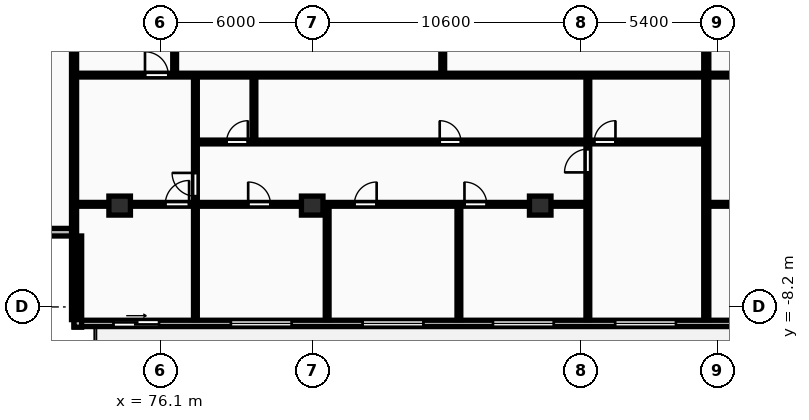
"""IFC4 building model, lengths in metres.
Left out: names, types, materials, properties, quantities, classifications, styles, units other than length and angle.
Written with IfcOpenShell. Run it as: python <this file> out.ifc"""

import sys

from ifc_helpers import new_model, si_unit, direction, frame, frame_2d, origin, origin_2d, place, context, subcontext, project, spatial, rectangle, extrude, element, fill, save


model = new_model("IFC4")
c1 = context("Model", 3, precision=1e-05, world=origin(), true_north=direction((0.0, 1.0)))
c2 = subcontext(c1, "Body", "Model", "MODEL_VIEW")
j1 = project(units=[si_unit("LENGTHUNIT", "METRE"), si_unit("PLANEANGLEUNIT", "RADIAN")], contexts=[c1])
p1 = place(None, origin())
s1 = spatial("IfcSite", under=j1, at=p1, CompositionType="ELEMENT")
p2 = place(p1, origin())
s2 = spatial("IfcBuilding", under=s1, at=p2, CompositionType="ELEMENT")
p3 = place(p2, frame((0.0, 0.0, 132.8)))
s3 = spatial("IfcBuildingStorey", under=s2, at=p3, CompositionType="ELEMENT", Elevation=132.8)
for number, where, z_axis, x_axis in (
    (1, (74.5, -4.2, 0.0), (0.0, 0.0, 1.0), (1.0, 0.0, 0.0)),
    (2, (82.1, -4.2, 0.0), (0.0, 0.0, 1.0), (1.0, 0.0, 0.0)),
    (3, (91.1, -4.2, 0.0), (0.0, 0.0, 1.0), (1.0, 0.0, 0.0)),
):
    element("IfcColumn", number, at=place(p3, frame(where, z_axis=z_axis, x_axis=x_axis)), inside=s3, PredefinedType="COLUMN", context=c2, shape_type="SweptSolid", body=[
        extrude(rectangle(XDim=0.85, YDim=0.75, at=origin_2d()), origin(), (0.0, 0.0, 1.0), 3.25),
    ])
p4 = place(p3, frame((72.7, -8.85, 0.0), z_axis=(0.0, 0.0, 1.0), x_axis=(1.0, 0.0, 0.0)))
e4 = element("IfcWall", 4, at=p4, inside=s3, PredefinedType="STANDARD", context=c2, shape_type="SweptSolid", body=[
    extrude(rectangle(XDim=58.0, YDim=0.25, at=frame_2d((29.0, 0.0))), origin(), (0.0, 0.0, 1.0), 2.97),
])
p5 = place(p4, frame((6.19, 0.0, 0.85)))
e5 = element("IfcOpeningElement", 5, at=p5, cuts=e4, PredefinedType="OPENING", context=c2, shape_type="SweptSolid", body=[
    extrude(rectangle(XDim=2.4, YDim=1.9, at=frame_2d((1.2, 0.95))), frame((0.0, 0.135, 0.0), z_axis=(0.0, -1.0, 0.0), x_axis=(1.0, 0.0, 0.0)), (0.0, 0.0, 1.0), 0.27),
])
p6 = place(p4, frame((11.39, 0.0, 0.85)))
e6 = element("IfcOpeningElement", 6, at=p6, cuts=e4, PredefinedType="OPENING", context=c2, shape_type="SweptSolid", body=[
    extrude(rectangle(XDim=2.4, YDim=1.9, at=frame_2d((1.2, 0.95))), frame((0.0, 0.135, 0.0), z_axis=(0.0, -1.0, 0.0), x_axis=(1.0, 0.0, 0.0)), (0.0, 0.0, 1.0), 0.27),
])
p7 = place(p4, frame((16.535, 0.0, 0.85)))
e7 = element("IfcOpeningElement", 7, at=p7, cuts=e4, PredefinedType="OPENING", context=c2, shape_type="SweptSolid", body=[
    extrude(rectangle(XDim=2.4, YDim=1.9, at=frame_2d((1.2, 0.95))), frame((0.0, 0.135, 0.0), z_axis=(0.0, -1.0, 0.0), x_axis=(1.0, 0.0, 0.0)), (0.0, 0.0, 1.0), 0.27),
])
p8 = place(p4, frame((1.555, 0.0, 0.0)))
e8 = element("IfcOpeningElement", 8, at=p8, cuts=e4, PredefinedType="OPENING", context=c2, shape_type="SweptSolid", body=[
    extrude(rectangle(XDim=1.8, YDim=2.2, at=frame_2d((0.9, 1.1))), frame((0.0, 0.135, 0.0), z_axis=(0.0, -1.0, 0.0), x_axis=(1.0, 0.0, 0.0)), (0.0, 0.0, 1.0), 0.27),
])
p9 = place(p4, frame((21.357, 0.0, 0.85)))
e9 = element("IfcOpeningElement", 9, at=p9, cuts=e4, PredefinedType="OPENING", context=c2, shape_type="SweptSolid", body=[
    extrude(rectangle(XDim=2.4, YDim=1.9, at=frame_2d((1.2, 0.95))), frame((0.0, 0.135, 0.0), z_axis=(0.0, -1.0, 0.0), x_axis=(1.0, 0.0, 0.0)), (0.0, 0.0, 1.0), 0.27),
])
p10 = place(p4, frame((31.037, 0.0, 0.85)))
e10 = element("IfcOpeningElement", 10, at=p10, cuts=e4, PredefinedType="OPENING", context=c2, shape_type="SweptSolid", body=[
    extrude(rectangle(XDim=2.4, YDim=1.9, at=frame_2d((1.2, 0.95))), frame((0.0, 0.135, 0.0), z_axis=(0.0, -1.0, 0.0), x_axis=(1.0, 0.0, 0.0)), (0.0, 0.0, 1.0), 0.27),
])
p11 = place(p4, frame((35.578, 0.0, 0.85)))
e11 = element("IfcOpeningElement", 11, at=p11, cuts=e4, PredefinedType="OPENING", context=c2, shape_type="SweptSolid", body=[
    extrude(rectangle(XDim=2.4, YDim=1.9, at=frame_2d((1.2, 0.95))), frame((0.0, 0.135, 0.0), z_axis=(0.0, -1.0, 0.0), x_axis=(1.0, 0.0, 0.0)), (0.0, 0.0, 1.0), 0.27),
])
p12 = place(p4, frame((26.615, 0.0, 0.0)))
e12 = element("IfcOpeningElement", 12, at=p12, cuts=e4, PredefinedType="OPENING", context=c2, shape_type="SweptSolid", body=[
    extrude(rectangle(XDim=1.8, YDim=2.2, at=frame_2d((0.9, 1.1))), frame((0.0, 0.135, 0.0), z_axis=(0.0, -1.0, 0.0), x_axis=(1.0, 0.0, 0.0)), (0.0, 0.0, 1.0), 0.27),
])
p13 = place(p4, frame((40.051, 0.0, 0.85)))
e13 = element("IfcOpeningElement", 13, at=p13, cuts=e4, PredefinedType="OPENING", context=c2, shape_type="SweptSolid", body=[
    extrude(rectangle(XDim=2.4, YDim=1.9, at=frame_2d((1.2, 0.95))), frame((0.0, 0.135, 0.0), z_axis=(0.0, -1.0, 0.0), x_axis=(1.0, 0.0, 0.0)), (0.0, 0.0, 1.0), 0.27),
])
p14 = place(p4, frame((48.113, 0.0, 0.0)))
e14 = element("IfcOpeningElement", 14, at=p14, cuts=e4, PredefinedType="OPENING", context=c2, shape_type="SweptSolid", body=[
    extrude(rectangle(XDim=1.8, YDim=2.2, at=frame_2d((0.9, 1.1))), frame((0.0, 0.135, 0.0), z_axis=(0.0, -1.0, 0.0), x_axis=(1.0, 0.0, 0.0)), (0.0, 0.0, 1.0), 0.27),
])
p15 = place(p4, frame((54.9, 0.0, 0.85)))
e15 = element("IfcOpeningElement", 15, at=p15, cuts=e4, PredefinedType="OPENING", context=c2, shape_type="SweptSolid", body=[
    extrude(rectangle(XDim=2.4, YDim=1.9, at=frame_2d((1.2, 0.95))), frame((0.0, 0.135, 0.0), z_axis=(0.0, -1.0, 0.0), x_axis=(1.0, 0.0, 0.0)), (0.0, 0.0, 1.0), 0.27),
])
p16 = place(p3, frame((69.1, -5.25, 0.0), z_axis=(0.0, 0.0, 1.0), x_axis=(1.0, 0.0, 0.0)))
e16 = element("IfcWall", 16, at=p16, inside=s3, PredefinedType="STANDARD", context=c2, shape_type="SweptSolid", body=[
    extrude(rectangle(XDim=3.6, YDim=0.3, at=frame_2d((1.8, 0.0))), origin(), (0.0, 0.0, 1.0), 2.97),
])
p17 = place(p3, frame((72.85, -5.4, 0.0), z_axis=(0.0, 0.0, 1.0), x_axis=(0.0, -1.0, 0.0)))
e17 = element("IfcWall", 17, at=p17, inside=s3, PredefinedType="STANDARD", context=c2, shape_type="SweptSolid", body=[
    extrude(rectangle(XDim=3.6, YDim=0.3, at=frame_2d((1.8, 0.0))), origin(), (0.0, 0.0, 1.0), 2.97),
])
for number, where, z_axis, x_axis in (
    (18, (72.7, -8.7, 0.0), (0.0, 0.0, 1.0), (0.0, 1.0, 0.0)),
    (19, (97.655, -8.7, 0.0), (0.0, 0.0, 1.0), (0.0, 1.0, 0.0)),
):
    element("IfcWall", number, at=place(p3, frame(where, z_axis=z_axis, x_axis=x_axis)), inside=s3, PredefinedType="PARTITIONING", context=c2, shape_type="SweptSolid", body=[
        extrude(rectangle(XDim=24.57, YDim=0.2, at=frame_2d((12.285, 0.0))), origin(), (0.0, 0.0, 1.0), 2.97),
    ])
p18 = place(p3, frame((87.252, 0.99, 0.0), z_axis=(0.0, 0.0, 1.0), x_axis=(0.0, 1.0, 0.0)))
e20 = element("IfcWall", 20, at=p18, inside=s3, PredefinedType="PARTITIONING", context=c2, shape_type="SweptSolid", body=[
    extrude(rectangle(XDim=14.9, YDim=0.15, at=frame_2d((7.45, 0.0))), origin(), (0.0, 0.0, 1.0), 2.97),
])
p19 = place(p18, frame((6.36, 0.0, 0.0)))
e21 = element("IfcOpeningElement", 21, at=p19, cuts=e20, PredefinedType="OPENING", context=c2, shape_type="SweptSolid", body=[
    extrude(rectangle(XDim=0.84, YDim=2.04, at=frame_2d((0.42, 1.02))), frame((0.0, 0.085, 0.0), z_axis=(0.0, -1.0, 0.0), x_axis=(1.0, 0.0, 0.0)), (0.0, 0.0, 1.0), 0.17),
])
p20 = place(p18, frame((7.7, 0.0, 0.0)))
e22 = element("IfcOpeningElement", 22, at=p20, cuts=e20, PredefinedType="OPENING", context=c2, shape_type="SweptSolid", body=[
    extrude(rectangle(XDim=0.88, YDim=2.06, at=frame_2d((0.44, 1.03))), frame((0.0, 0.085, 0.0), z_axis=(0.0, -1.0, 0.0), x_axis=(1.0, 0.0, 0.0)), (0.0, 0.0, 1.0), 0.17),
])
p21 = place(p3, frame((76.67, 0.99, 0.0), z_axis=(0.0, 0.0, 1.0), x_axis=(0.0, 1.0, 0.0)))
e23 = element("IfcWall", 23, at=p21, inside=s3, PredefinedType="PARTITIONING", context=c2, shape_type="SweptSolid", body=[
    extrude(rectangle(XDim=14.9, YDim=0.15, at=frame_2d((7.45, 0.0))), origin(), (0.0, 0.0, 1.0), 2.97),
])
p22 = place(p21, frame((3.216, 0.0, 0.0)))
e24 = element("IfcOpeningElement", 24, at=p22, cuts=e23, PredefinedType="OPENING", context=c2, shape_type="SweptSolid", body=[
    extrude(rectangle(XDim=0.88, YDim=2.06, at=frame_2d((0.44, 1.03))), frame((0.0, 0.085, 0.0), z_axis=(0.0, -1.0, 0.0), x_axis=(1.0, 0.0, 0.0)), (0.0, 0.0, 1.0), 0.17),
])
p23 = place(p3, frame((79.8, -1.67, 0.0), z_axis=(0.0, 0.0, 1.0), x_axis=(0.0, 1.0, 0.0)))
e25 = element("IfcWall", 25, at=p23, inside=s3, PredefinedType="PARTITIONING", context=c2, shape_type="SweptSolid", body=[
    extrude(rectangle(XDim=2.58, YDim=0.15, at=frame_2d((1.29, 0.0))), origin(), (0.0, 0.0, 1.0), 2.97),
])
for number, where, z_axis, x_axis in (
    (26, (82.69, -8.7, 0.0), (0.0, 0.0, 1.0), (0.0, 1.0, 0.0)),
    (27, (87.89, -8.7, 0.0), (0.0, 0.0, 1.0), (0.0, 1.0, 0.0)),
):
    element("IfcWall", number, at=place(p3, frame(where, z_axis=z_axis, x_axis=x_axis)), inside=s3, PredefinedType="PARTITIONING", context=c2, shape_type="SweptSolid", body=[
        extrude(rectangle(XDim=4.47, YDim=0.15, at=frame_2d((2.235, 0.0))), origin(), (0.0, 0.0, 1.0), 2.97),
    ])
p24 = place(p3, frame((77.49, -8.7, 0.0), z_axis=(0.0, 0.0, 1.0), x_axis=(0.0, 1.0, 0.0)))
e28 = element("IfcWall", 28, at=p24, inside=s3, PredefinedType="PARTITIONING", context=c2, shape_type="SweptSolid", body=[
    extrude(rectangle(XDim=9.61, YDim=0.15, at=frame_2d((4.805, 0.0))), origin(), (0.0, 0.0, 1.0), 2.97),
])
p25 = place(p24, frame((4.87, 0.0, 0.0)))
e29 = element("IfcOpeningElement", 29, at=p25, cuts=e28, PredefinedType="OPENING", context=c2, shape_type="SweptSolid", body=[
    extrude(rectangle(XDim=0.92, YDim=2.08, at=frame_2d((0.46, 1.04))), frame((0.0, 0.085, 0.0), z_axis=(0.0, -1.0, 0.0), x_axis=(1.0, 0.0, 0.0)), (0.0, 0.0, 1.0), 0.17),
])
p26 = place(p3, frame((92.98, -1.67, 0.0), z_axis=(0.0, 0.0, 1.0), x_axis=(0.0, 1.0, 0.0)))
e30 = element("IfcWall", 30, at=p26, inside=s3, PredefinedType="PARTITIONING", context=c2, shape_type="SweptSolid", body=[
    extrude(rectangle(XDim=2.58, YDim=0.15, at=frame_2d((1.29, 0.0))), origin(), (0.0, 0.0, 1.0), 2.97),
])
p27 = place(p3, frame((92.98, -8.7, 0.0), z_axis=(0.0, 0.0, 1.0), x_axis=(0.0, 1.0, 0.0)))
e31 = element("IfcWall", 31, at=p27, inside=s3, PredefinedType="PARTITIONING", context=c2, shape_type="SweptSolid", body=[
    extrude(rectangle(XDim=6.99, YDim=0.15, at=frame_2d((3.495, 0.0))), origin(), (0.0, 0.0, 1.0), 2.97),
])
p28 = place(p27, frame((5.81, 0.0, 0.0)))
e32 = element("IfcOpeningElement", 32, at=p28, cuts=e31, PredefinedType="OPENING", context=c2, shape_type="SweptSolid", body=[
    extrude(rectangle(XDim=0.92, YDim=2.08, at=frame_2d((0.46, 1.04))), frame((0.0, 0.085, 0.0), z_axis=(0.0, -1.0, 0.0), x_axis=(1.0, 0.0, 0.0)), (0.0, 0.0, 1.0), 0.17),
])
p29 = place(p3, frame((77.53, -1.69, 0.0), z_axis=(0.0, 0.0, 1.0), x_axis=(1.0, 0.0, 0.0)))
e33 = element("IfcWall", 33, at=p29, inside=s3, PredefinedType="PARTITIONING", context=c2, shape_type="SweptSolid", body=[
    extrude(rectangle(XDim=20.044, YDim=0.15, at=frame_2d((10.022, 0.0))), origin(), (0.0, 0.0, 1.0), 2.97),
])
p30 = place(p29, frame((1.191, 0.0, 0.0)))
e34 = element("IfcOpeningElement", 34, at=p30, cuts=e33, PredefinedType="OPENING", context=c2, shape_type="SweptSolid", body=[
    extrude(rectangle(XDim=0.84, YDim=2.04, at=frame_2d((0.42, 1.02))), frame((0.0, 0.085, 0.0), z_axis=(0.0, -1.0, 0.0), x_axis=(1.0, 0.0, 0.0)), (0.0, 0.0, 1.0), 0.17),
])
p31 = place(p29, frame((9.602, 0.0, 0.0)))
e35 = element("IfcOpeningElement", 35, at=p31, cuts=e33, PredefinedType="OPENING", context=c2, shape_type="SweptSolid", body=[
    extrude(rectangle(XDim=0.84, YDim=2.04, at=frame_2d((0.42, 1.02))), frame((0.0, 0.085, 0.0), z_axis=(0.0, -1.0, 0.0), x_axis=(1.0, 0.0, 0.0)), (0.0, 0.0, 1.0), 0.17),
])
p32 = place(p29, frame((15.7, 0.0, 0.0)))
e36 = element("IfcOpeningElement", 36, at=p32, cuts=e33, PredefinedType="OPENING", context=c2, shape_type="SweptSolid", body=[
    extrude(rectangle(XDim=0.84, YDim=2.04, at=frame_2d((0.42, 1.02))), frame((0.0, 0.085, 0.0), z_axis=(0.0, -1.0, 0.0), x_axis=(1.0, 0.0, 0.0)), (0.0, 0.0, 1.0), 0.17),
])
p33 = place(p3, frame((72.78, 0.95, 0.0), z_axis=(0.0, 0.0, 1.0), x_axis=(1.0, 0.0, 0.0)))
e37 = element("IfcWall", 37, at=p33, inside=s3, PredefinedType="PARTITIONING", context=c2, shape_type="SweptSolid", body=[
    extrude(rectangle(XDim=24.794, YDim=0.15, at=frame_2d((12.397, 0.0))), origin(), (0.0, 0.0, 1.0), 2.97),
])
p34 = place(p33, frame((2.72, 0.0, 0.0)))
e38 = element("IfcOpeningElement", 38, at=p34, cuts=e37, PredefinedType="OPENING", context=c2, shape_type="SweptSolid", body=[
    extrude(rectangle(XDim=0.92, YDim=2.08, at=frame_2d((0.46, 1.04))), frame((0.0, 0.085, 0.0), z_axis=(0.0, -1.0, 0.0), x_axis=(1.0, 0.0, 0.0)), (0.0, 0.0, 1.0), 0.17),
])
p35 = place(p3, frame((72.78, -4.15, 0.0), z_axis=(0.0, 0.0, 1.0), x_axis=(1.0, 0.0, 0.0)))
e39 = element("IfcWall", 39, at=p35, inside=s3, PredefinedType="PARTITIONING", context=c2, shape_type="SweptSolid", body=[
    extrude(rectangle(XDim=20.2, YDim=0.15, at=frame_2d((10.1, 0.0))), origin(), (0.0, 0.0, 1.0), 2.663),
])
p36 = place(p35, frame((3.52, 0.0, 0.0)))
e40 = element("IfcOpeningElement", 40, at=p36, cuts=e39, PredefinedType="OPENING", context=c2, shape_type="SweptSolid", body=[
    extrude(rectangle(XDim=0.94, YDim=2.1, at=frame_2d((0.47, 1.05))), frame((0.0, 0.085, 0.0), z_axis=(0.0, -1.0, 0.0), x_axis=(1.0, 0.0, 0.0)), (0.0, 0.0, 1.0), 0.17),
])
p37 = place(p35, frame((6.792, 0.0, 0.0)))
e41 = element("IfcOpeningElement", 41, at=p37, cuts=e39, PredefinedType="OPENING", context=c2, shape_type="SweptSolid", body=[
    extrude(rectangle(XDim=0.88, YDim=2.06, at=frame_2d((0.44, 1.03))), frame((0.0, 0.085, 0.0), z_axis=(0.0, -1.0, 0.0), x_axis=(1.0, 0.0, 0.0)), (0.0, 0.0, 1.0), 0.17),
])
p38 = place(p35, frame((10.984, 0.0, 0.0)))
e42 = element("IfcOpeningElement", 42, at=p38, cuts=e39, PredefinedType="OPENING", context=c2, shape_type="SweptSolid", body=[
    extrude(rectangle(XDim=0.88, YDim=2.06, at=frame_2d((0.44, 1.03))), frame((0.0, 0.085, 0.0), z_axis=(0.0, -1.0, 0.0), x_axis=(1.0, 0.0, 0.0)), (0.0, 0.0, 1.0), 0.17),
])
p39 = place(p35, frame((15.33, 0.0, 0.0)))
e43 = element("IfcOpeningElement", 43, at=p39, cuts=e39, PredefinedType="OPENING", context=c2, shape_type="SweptSolid", body=[
    extrude(rectangle(XDim=0.88, YDim=2.06, at=frame_2d((0.44, 1.03))), frame((0.0, 0.085, 0.0), z_axis=(0.0, -1.0, 0.0), x_axis=(1.0, 0.0, 0.0)), (0.0, 0.0, 1.0), 0.17),
])
p40 = place(p3, frame((97.735, 0.95, 0.0), z_axis=(0.0, 0.0, 1.0), x_axis=(1.0, 0.0, 0.0)))
e44 = element("IfcWall", 44, at=p40, inside=s3, PredefinedType="PARTITIONING", context=c2, shape_type="SweptSolid", body=[
    extrude(rectangle(XDim=18.472, YDim=0.15, at=frame_2d((9.236, 0.0))), origin(), (0.0, 0.0, 1.0), 2.97),
])
p41 = place(p40, frame((2.72, 0.0, 0.0)))
e45 = element("IfcOpeningElement", 45, at=p41, cuts=e44, PredefinedType="OPENING", context=c2, shape_type="SweptSolid", body=[
    extrude(rectangle(XDim=0.92, YDim=2.08, at=frame_2d((0.46, 1.04))), frame((0.0, 0.085, 0.0), z_axis=(0.0, -1.0, 0.0), x_axis=(1.0, 0.0, 0.0)), (0.0, 0.0, 1.0), 0.17),
])
p42 = place(p3, frame((97.735, -4.15, 0.0), z_axis=(0.0, 0.0, 1.0), x_axis=(1.0, 0.0, 0.0)))
e46 = element("IfcWall", 46, at=p42, inside=s3, PredefinedType="PARTITIONING", context=c2, shape_type="SweptSolid", body=[
    extrude(rectangle(XDim=14.002, YDim=0.15, at=frame_2d((7.001, 0.0))), origin(), (0.0, 0.0, 1.0), 2.663),
])
p43 = place(p42, frame((3.73, 0.0, 0.0)))
e47 = element("IfcOpeningElement", 47, at=p43, cuts=e46, PredefinedType="OPENING", context=c2, shape_type="SweptSolid", body=[
    extrude(rectangle(XDim=0.94, YDim=2.1, at=frame_2d((0.47, 1.05))), frame((0.0, 0.085, 0.0), z_axis=(0.0, -1.0, 0.0), x_axis=(1.0, 0.0, 0.0)), (0.0, 0.0, 1.0), 0.17),
])
p44 = place(p42, frame((6.561, 0.0, 0.0)))
e48 = element("IfcOpeningElement", 48, at=p44, cuts=e46, PredefinedType="OPENING", context=c2, shape_type="SweptSolid", body=[
    extrude(rectangle(XDim=0.88, YDim=2.06, at=frame_2d((0.44, 1.03))), frame((0.0, 0.085, 0.0), z_axis=(0.0, -1.0, 0.0), x_axis=(1.0, 0.0, 0.0)), (0.0, 0.0, 1.0), 0.17),
])
p45 = place(p42, frame((12.902, 0.0, 0.0)))
e49 = element("IfcOpeningElement", 49, at=p45, cuts=e46, PredefinedType="OPENING", context=c2, shape_type="SweptSolid", body=[
    extrude(rectangle(XDim=0.88, YDim=2.06, at=frame_2d((0.44, 1.03))), frame((0.0, 0.085, 0.0), z_axis=(0.0, -1.0, 0.0), x_axis=(1.0, 0.0, 0.0)), (0.0, 0.0, 1.0), 0.17),
])
p46 = place(p5, origin())
e50 = element("IfcWindow", 50, at=p46, inside=s3, PartitioningType="DOUBLE_PANEL_VERTICAL", PredefinedType="WINDOW", context=c2, shape_type="SweptSolid", body=[
    extrude(rectangle(XDim=2.4, YDim=1.9, at=frame_2d((1.2, 0.95))), frame((0.0, 0.03, 0.0), z_axis=(0.0, -1.0, 0.0), x_axis=(1.0, 0.0, 0.0)), (0.0, 0.0, 1.0), 0.06),
])
fill(e5, e50)
p47 = place(p6, origin())
e51 = element("IfcWindow", 51, at=p47, inside=s3, PartitioningType="DOUBLE_PANEL_VERTICAL", PredefinedType="WINDOW", context=c2, shape_type="SweptSolid", body=[
    extrude(rectangle(XDim=2.4, YDim=1.9, at=frame_2d((1.2, 0.95))), frame((0.0, 0.03, 0.0), z_axis=(0.0, -1.0, 0.0), x_axis=(1.0, 0.0, 0.0)), (0.0, 0.0, 1.0), 0.06),
])
fill(e6, e51)
p48 = place(p7, origin())
e52 = element("IfcWindow", 52, at=p48, inside=s3, PartitioningType="DOUBLE_PANEL_VERTICAL", PredefinedType="WINDOW", context=c2, shape_type="SweptSolid", body=[
    extrude(rectangle(XDim=2.4, YDim=1.9, at=frame_2d((1.2, 0.95))), frame((0.0, 0.03, 0.0), z_axis=(0.0, -1.0, 0.0), x_axis=(1.0, 0.0, 0.0)), (0.0, 0.0, 1.0), 0.06),
])
fill(e7, e52)
p49 = place(p8, origin())
e53 = element("IfcDoor", 53, at=p49, inside=s3, OperationType="SLIDING_TO_RIGHT", PredefinedType="DOOR", context=c2, shape_type="SweptSolid", body=[
    extrude(rectangle(XDim=1.8, YDim=2.2, at=frame_2d((0.9, 1.1))), frame((0.0, 0.025, 0.0), z_axis=(0.0, -1.0, 0.0), x_axis=(1.0, 0.0, 0.0)), (0.0, 0.0, 1.0), 0.05),
])
fill(e8, e53)
p50 = place(p9, origin())
e54 = element("IfcWindow", 54, at=p50, inside=s3, PartitioningType="DOUBLE_PANEL_VERTICAL", PredefinedType="WINDOW", context=c2, shape_type="SweptSolid", body=[
    extrude(rectangle(XDim=2.4, YDim=1.9, at=frame_2d((1.2, 0.95))), frame((0.0, 0.03, 0.0), z_axis=(0.0, -1.0, 0.0), x_axis=(1.0, 0.0, 0.0)), (0.0, 0.0, 1.0), 0.06),
])
fill(e9, e54)
p51 = place(p25, origin())
e55 = element("IfcDoor", 55, at=p51, inside=s3, OperationType="SINGLE_SWING_RIGHT", PredefinedType="DOOR", context=c2, shape_type="SweptSolid", body=[
    extrude(rectangle(XDim=0.92, YDim=2.08, at=frame_2d((0.46, 1.04))), frame((0.0, 0.025, 0.0), z_axis=(0.0, -1.0, 0.0), x_axis=(1.0, 0.0, 0.0)), (0.0, 0.0, 1.0), 0.05),
])
fill(e29, e55)
p52 = place(p28, origin())
e56 = element("IfcDoor", 56, at=p52, inside=s3, OperationType="SINGLE_SWING_LEFT", PredefinedType="DOOR", context=c2, shape_type="SweptSolid", body=[
    extrude(rectangle(XDim=0.92, YDim=2.08, at=frame_2d((0.46, 1.04))), frame((0.0, 0.025, 0.0), z_axis=(0.0, -1.0, 0.0), x_axis=(1.0, 0.0, 0.0)), (0.0, 0.0, 1.0), 0.05),
])
fill(e32, e56)
p53 = place(p30, origin())
e57 = element("IfcDoor", 57, at=p53, inside=s3, OperationType="SINGLE_SWING_RIGHT", PredefinedType="DOOR", context=c2, shape_type="SweptSolid", body=[
    extrude(rectangle(XDim=0.84, YDim=2.04, at=frame_2d((0.42, 1.02))), frame((0.0, 0.025, 0.0), z_axis=(0.0, -1.0, 0.0), x_axis=(1.0, 0.0, 0.0)), (0.0, 0.0, 1.0), 0.05),
])
fill(e34, e57)
p54 = place(p31, origin())
e58 = element("IfcDoor", 58, at=p54, inside=s3, OperationType="SINGLE_SWING_LEFT", PredefinedType="DOOR", context=c2, shape_type="SweptSolid", body=[
    extrude(rectangle(XDim=0.84, YDim=2.04, at=frame_2d((0.42, 1.02))), frame((0.0, 0.025, 0.0), z_axis=(0.0, -1.0, 0.0), x_axis=(1.0, 0.0, 0.0)), (0.0, 0.0, 1.0), 0.05),
])
fill(e35, e58)
p55 = place(p32, origin())
e59 = element("IfcDoor", 59, at=p55, inside=s3, OperationType="SINGLE_SWING_RIGHT", PredefinedType="DOOR", context=c2, shape_type="SweptSolid", body=[
    extrude(rectangle(XDim=0.84, YDim=2.04, at=frame_2d((0.42, 1.02))), frame((0.0, 0.025, 0.0), z_axis=(0.0, -1.0, 0.0), x_axis=(1.0, 0.0, 0.0)), (0.0, 0.0, 1.0), 0.05),
])
fill(e36, e59)
p56 = place(p34, origin())
e60 = element("IfcDoor", 60, at=p56, inside=s3, OperationType="SINGLE_SWING_LEFT", PredefinedType="DOOR", context=c2, shape_type="SweptSolid", body=[
    extrude(rectangle(XDim=0.92, YDim=2.08, at=frame_2d((0.46, 1.04))), frame((0.0, 0.025, 0.0), z_axis=(0.0, -1.0, 0.0), x_axis=(1.0, 0.0, 0.0)), (0.0, 0.0, 1.0), 0.05),
])
fill(e38, e60)
p57 = place(p36, origin())
e61 = element("IfcDoor", 61, at=p57, inside=s3, OperationType="SINGLE_SWING_RIGHT", PredefinedType="DOOR", context=c2, shape_type="SweptSolid", body=[
    extrude(rectangle(XDim=0.94, YDim=2.1, at=frame_2d((0.47, 1.05))), frame((0.0, 0.025, 0.0), z_axis=(0.0, -1.0, 0.0), x_axis=(1.0, 0.0, 0.0)), (0.0, 0.0, 1.0), 0.05),
])
fill(e40, e61)
p58 = place(p37, origin())
e62 = element("IfcDoor", 62, at=p58, inside=s3, OperationType="SINGLE_SWING_LEFT", PredefinedType="DOOR", context=c2, shape_type="SweptSolid", body=[
    extrude(rectangle(XDim=0.88, YDim=2.06, at=frame_2d((0.44, 1.03))), frame((0.0, 0.025, 0.0), z_axis=(0.0, -1.0, 0.0), x_axis=(1.0, 0.0, 0.0)), (0.0, 0.0, 1.0), 0.05),
])
fill(e41, e62)
p59 = place(p38, origin())
e63 = element("IfcDoor", 63, at=p59, inside=s3, OperationType="SINGLE_SWING_RIGHT", PredefinedType="DOOR", context=c2, shape_type="SweptSolid", body=[
    extrude(rectangle(XDim=0.88, YDim=2.06, at=frame_2d((0.44, 1.03))), frame((0.0, 0.025, 0.0), z_axis=(0.0, -1.0, 0.0), x_axis=(1.0, 0.0, 0.0)), (0.0, 0.0, 1.0), 0.05),
])
fill(e42, e63)
p60 = place(p39, origin())
e64 = element("IfcDoor", 64, at=p60, inside=s3, OperationType="SINGLE_SWING_LEFT", PredefinedType="DOOR", context=c2, shape_type="SweptSolid", body=[
    extrude(rectangle(XDim=0.88, YDim=2.06, at=frame_2d((0.44, 1.03))), frame((0.0, 0.025, 0.0), z_axis=(0.0, -1.0, 0.0), x_axis=(1.0, 0.0, 0.0)), (0.0, 0.0, 1.0), 0.05),
])
fill(e43, e64)
save(model, sys.argv[1])
